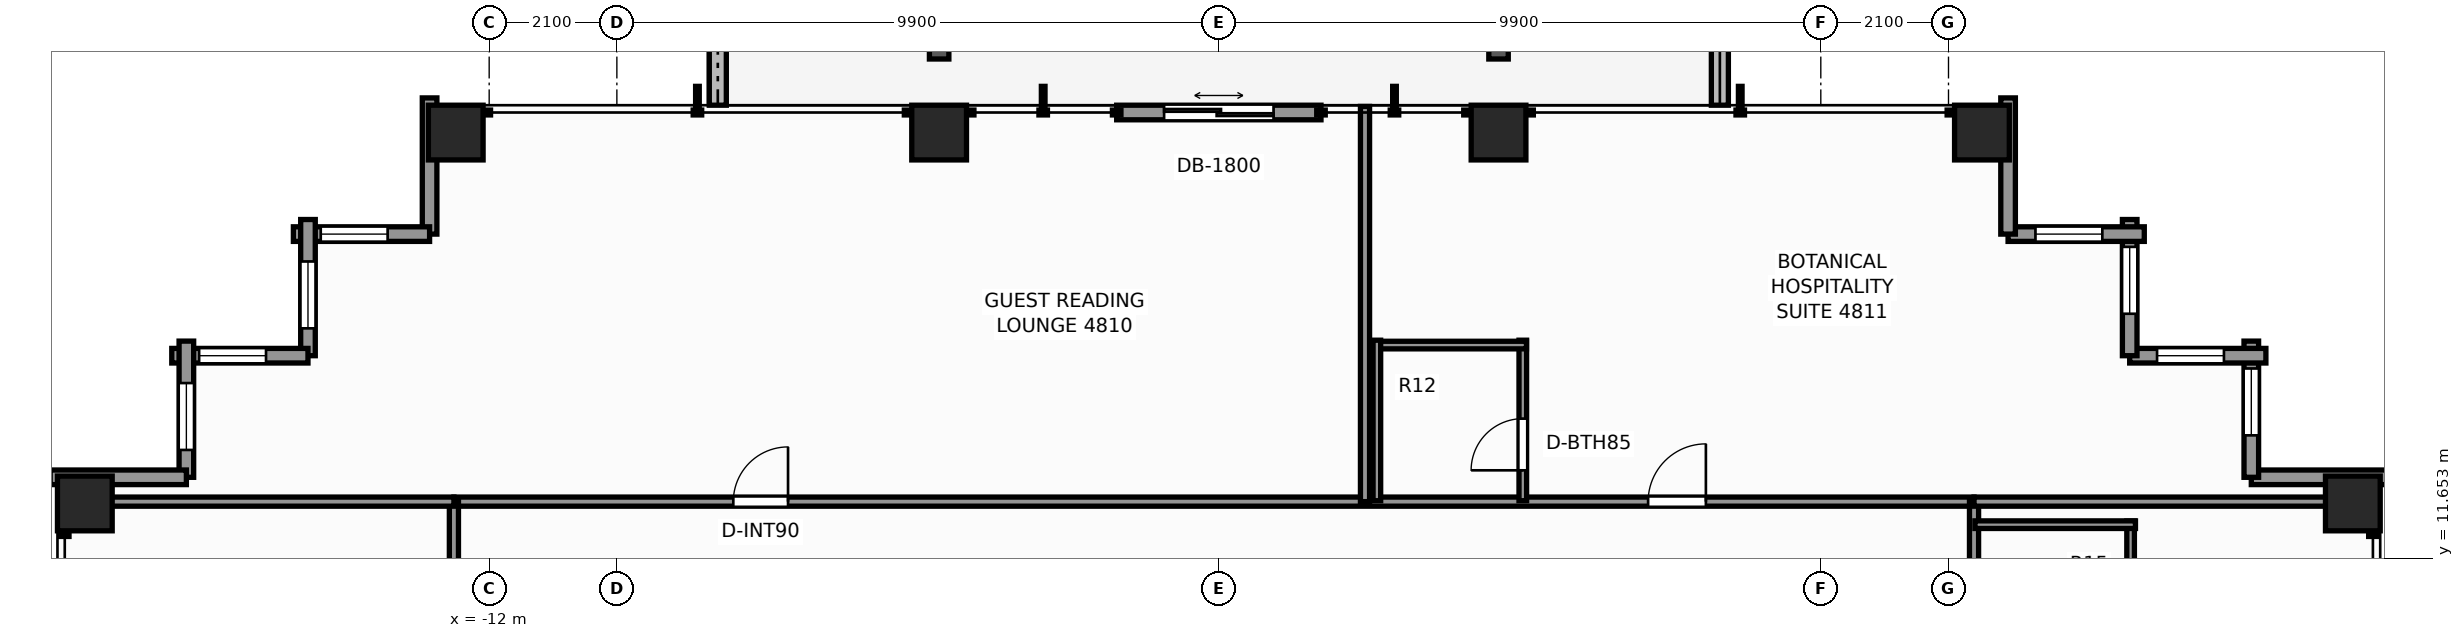
"""IFC4 building model, lengths in metres.
Left out: names, types, materials, properties, quantities, classifications, styles, units other than length and angle.
Written with IfcOpenShell. Run it as: python <this file> out.ifc"""

import sys

from ifc_helpers import new_model, si_unit, direction, frame, frame_2d, origin, origin_2d, place, context, subcontext, project, spatial, rectangle, extrude, element, fill, save


model = new_model("IFC4")
c1 = context("Model", 3, precision=1e-05, world=origin(), true_north=direction((0.0, 1.0)))
c2 = subcontext(c1, "Body", "Model", "MODEL_VIEW")
j1 = project(units=[si_unit("LENGTHUNIT", "METRE"), si_unit("PLANEANGLEUNIT", "RADIAN")], contexts=[c1])
p1 = place(None, origin())
s1 = spatial("IfcSite", under=j1, at=p1, CompositionType="ELEMENT")
p2 = place(p1, origin())
s2 = spatial("IfcBuilding", under=s1, at=p2, CompositionType="ELEMENT")
p3 = place(p2, frame((0.0, 0.0, 166.8)))
s3 = spatial("IfcBuildingStorey", under=s2, at=p3, CompositionType="ELEMENT", Elevation=166.8)
for number, where, z_axis, x_axis in (
    (1, (-12.55, 18.65, 0.0), (0.0, 0.0, 1.0), (1.0, 0.0, 0.0)),
    (2, (-4.6, 18.65, 0.0), (0.0, 0.0, 1.0), (1.0, 0.0, 0.0)),
    (3, (4.6, 18.65, 0.0), (0.0, 0.0, 1.0), (1.0, 0.0, 0.0)),
    (4, (12.55, 18.65, 0.0), (0.0, 0.0, 1.0), (1.0, 0.0, 0.0)),
    (5, (-18.65, 12.55, 0.0), (0.0, 0.0, 1.0), (1.0, 0.0, 0.0)),
    (6, (18.65, 12.55, 0.0), (0.0, 0.0, 1.0), (1.0, 0.0, 0.0)),
):
    element("IfcColumn", number, at=place(p3, frame(where, z_axis=z_axis, x_axis=x_axis)), inside=s3, PredefinedType="COLUMN", context=c2, shape_type="SweptSolid", body=[
        extrude(rectangle(XDim=0.9, YDim=0.9, at=origin_2d()), origin(), (0.0, 0.0, 1.0), 3.3),
    ])
p4 = place(p3, frame((8.24, 19.1, -0.02), z_axis=(0.0, 0.0, 1.0), x_axis=(0.0, 1.0, 0.0)))
e7 = element("IfcWall", 7, at=p4, inside=s3, PredefinedType="PARAPET", context=c2, shape_type="SweptSolid", body=[
    extrude(rectangle(XDim=2.975, YDim=0.28, at=frame_2d((1.487, 0.0))), origin(), (0.0, 0.0, 1.0), 0.42),
])
p5 = place(p3, frame((-8.24, 20.805, -0.02), z_axis=(0.0, 0.0, 1.0), x_axis=(0.0, -1.0, 0.0)))
e8 = element("IfcWall", 8, at=p5, inside=s3, PredefinedType="PARAPET", context=c2, shape_type="SweptSolid", body=[
    extrude(rectangle(XDim=1.705, YDim=0.28, at=frame_2d((0.853, 0.0))), origin(), (0.0, 0.0, 1.0), 0.42),
])
p6 = place(p3, frame((16.98, 12.98, 0.0), z_axis=(0.0, 0.0, 1.0), x_axis=(1.0, 0.0, 0.0)))
e9 = element("IfcWall", 9, at=p6, inside=s3, PredefinedType="STANDARD", context=c2, shape_type="SweptSolid", body=[
    extrude(rectangle(XDim=2.24, YDim=0.24, at=frame_2d((1.12, 0.0))), origin(), (0.0, 0.0, 1.0), 2.483),
])
p7 = place(p3, frame((16.98, 15.22, 0.0), z_axis=(0.0, 0.0, 1.0), x_axis=(0.0, -1.0, 0.0)))
e10 = element("IfcWall", 10, at=p7, inside=s3, PredefinedType="STANDARD", context=c2, shape_type="SweptSolid", body=[
    extrude(rectangle(XDim=2.24, YDim=0.24, at=frame_2d((1.12, 0.0))), origin(), (0.0, 0.0, 1.0), 2.483),
])
p8 = place(p7, frame((0.45, 0.0, 0.65)))
e11 = element("IfcOpeningElement", 11, at=p8, cuts=e10, PredefinedType="OPENING", context=c2, shape_type="SweptSolid", body=[
    extrude(rectangle(XDim=1.1, YDim=1.45, at=frame_2d((0.55, 0.725))), frame((0.0, 0.13, 0.0), z_axis=(0.0, -1.0, 0.0), x_axis=(1.0, 0.0, 0.0)), (0.0, 0.0, 1.0), 0.26),
])
p9 = place(p3, frame((14.98, 14.98, 0.0), z_axis=(0.0, 0.0, 1.0), x_axis=(1.0, 0.0, 0.0)))
e12 = element("IfcWall", 12, at=p9, inside=s3, PredefinedType="STANDARD", context=c2, shape_type="SweptSolid", body=[
    extrude(rectangle(XDim=2.24, YDim=0.24, at=frame_2d((1.12, 0.0))), origin(), (0.0, 0.0, 1.0), 2.483),
])
p10 = place(p9, frame((0.45, 0.0, 0.65)))
e13 = element("IfcOpeningElement", 13, at=p10, cuts=e12, PredefinedType="OPENING", context=c2, shape_type="SweptSolid", body=[
    extrude(rectangle(XDim=1.1, YDim=1.45, at=frame_2d((0.55, 0.725))), frame((0.0, 0.13, 0.0), z_axis=(0.0, -1.0, 0.0), x_axis=(1.0, 0.0, 0.0)), (0.0, 0.0, 1.0), 0.26),
])
p11 = place(p3, frame((14.98, 17.22, 0.0), z_axis=(0.0, 0.0, 1.0), x_axis=(0.0, -1.0, 0.0)))
e14 = element("IfcWall", 14, at=p11, inside=s3, PredefinedType="STANDARD", context=c2, shape_type="SweptSolid", body=[
    extrude(rectangle(XDim=2.24, YDim=0.24, at=frame_2d((1.12, 0.0))), origin(), (0.0, 0.0, 1.0), 2.483),
])
p12 = place(p11, frame((0.45, 0.0, 0.65)))
e15 = element("IfcOpeningElement", 15, at=p12, cuts=e14, PredefinedType="OPENING", context=c2, shape_type="SweptSolid", body=[
    extrude(rectangle(XDim=1.1, YDim=1.45, at=frame_2d((0.55, 0.725))), frame((0.0, 0.13, 0.0), z_axis=(0.0, -1.0, 0.0), x_axis=(1.0, 0.0, 0.0)), (0.0, 0.0, 1.0), 0.26),
])
p13 = place(p3, frame((12.98, 16.98, 0.0), z_axis=(0.0, 0.0, 1.0), x_axis=(1.0, 0.0, 0.0)))
e16 = element("IfcWall", 16, at=p13, inside=s3, PredefinedType="STANDARD", context=c2, shape_type="SweptSolid", body=[
    extrude(rectangle(XDim=2.24, YDim=0.24, at=frame_2d((1.12, 0.0))), origin(), (0.0, 0.0, 1.0), 2.483),
])
p14 = place(p13, frame((0.45, 0.0, 0.65)))
e17 = element("IfcOpeningElement", 17, at=p14, cuts=e16, PredefinedType="OPENING", context=c2, shape_type="SweptSolid", body=[
    extrude(rectangle(XDim=1.1, YDim=1.45, at=frame_2d((0.55, 0.725))), frame((0.0, 0.13, 0.0), z_axis=(0.0, -1.0, 0.0), x_axis=(1.0, 0.0, 0.0)), (0.0, 0.0, 1.0), 0.26),
])
p15 = place(p3, frame((12.98, 19.22, 0.0), z_axis=(0.0, 0.0, 1.0), x_axis=(0.0, -1.0, 0.0)))
e18 = element("IfcWall", 18, at=p15, inside=s3, PredefinedType="STANDARD", context=c2, shape_type="SweptSolid", body=[
    extrude(rectangle(XDim=2.24, YDim=0.24, at=frame_2d((1.12, 0.0))), origin(), (0.0, 0.0, 1.0), 2.483),
])
p16 = place(p3, frame((-1.68, 18.98, 0.0), z_axis=(0.0, 0.0, 1.0), x_axis=(1.0, 0.0, 0.0)))
e19 = element("IfcWall", 19, at=p16, inside=s3, PredefinedType="STANDARD", context=c2, shape_type="SweptSolid", body=[
    extrude(rectangle(XDim=3.36, YDim=0.24, at=frame_2d((1.68, 0.0))), origin(), (0.0, 0.0, 1.0), 3.1),
])
p17 = place(p16, frame((0.78, 0.0, 0.0)))
e20 = element("IfcOpeningElement", 20, at=p17, cuts=e19, PredefinedType="OPENING", context=c2, shape_type="SweptSolid", body=[
    extrude(rectangle(XDim=1.8, YDim=2.2, at=frame_2d((0.9, 1.1))), frame((0.0, 0.13, 0.0), z_axis=(0.0, -1.0, 0.0), x_axis=(1.0, 0.0, 0.0)), (0.0, 0.0, 1.0), 0.26),
])
p18 = place(p3, frame((-12.98, 16.98, 0.0), z_axis=(0.0, 0.0, 1.0), x_axis=(0.0, 1.0, 0.0)))
e21 = element("IfcWall", 21, at=p18, inside=s3, PredefinedType="STANDARD", context=c2, shape_type="SweptSolid", body=[
    extrude(rectangle(XDim=2.24, YDim=0.24, at=frame_2d((1.12, 0.0))), origin(), (0.0, 0.0, 1.0), 2.483),
])
p19 = place(p3, frame((-15.22, 16.98, 0.0), z_axis=(0.0, 0.0, 1.0), x_axis=(1.0, 0.0, 0.0)))
e22 = element("IfcWall", 22, at=p19, inside=s3, PredefinedType="STANDARD", context=c2, shape_type="SweptSolid", body=[
    extrude(rectangle(XDim=2.24, YDim=0.24, at=frame_2d((1.12, 0.0))), origin(), (0.0, 0.0, 1.0), 2.483),
])
p20 = place(p19, frame((0.45, 0.0, 0.65)))
e23 = element("IfcOpeningElement", 23, at=p20, cuts=e22, PredefinedType="OPENING", context=c2, shape_type="SweptSolid", body=[
    extrude(rectangle(XDim=1.1, YDim=1.45, at=frame_2d((0.55, 0.725))), frame((0.0, 0.13, 0.0), z_axis=(0.0, -1.0, 0.0), x_axis=(1.0, 0.0, 0.0)), (0.0, 0.0, 1.0), 0.26),
])
p21 = place(p3, frame((-14.98, 14.98, 0.0), z_axis=(0.0, 0.0, 1.0), x_axis=(0.0, 1.0, 0.0)))
e24 = element("IfcWall", 24, at=p21, inside=s3, PredefinedType="STANDARD", context=c2, shape_type="SweptSolid", body=[
    extrude(rectangle(XDim=2.24, YDim=0.24, at=frame_2d((1.12, 0.0))), origin(), (0.0, 0.0, 1.0), 2.483),
])
p22 = place(p21, frame((0.45, 0.0, 0.65)))
e25 = element("IfcOpeningElement", 25, at=p22, cuts=e24, PredefinedType="OPENING", context=c2, shape_type="SweptSolid", body=[
    extrude(rectangle(XDim=1.1, YDim=1.45, at=frame_2d((0.55, 0.725))), frame((0.0, 0.13, 0.0), z_axis=(0.0, -1.0, 0.0), x_axis=(1.0, 0.0, 0.0)), (0.0, 0.0, 1.0), 0.26),
])
p23 = place(p3, frame((-17.22, 14.98, 0.0), z_axis=(0.0, 0.0, 1.0), x_axis=(1.0, 0.0, 0.0)))
e26 = element("IfcWall", 26, at=p23, inside=s3, PredefinedType="STANDARD", context=c2, shape_type="SweptSolid", body=[
    extrude(rectangle(XDim=2.24, YDim=0.24, at=frame_2d((1.12, 0.0))), origin(), (0.0, 0.0, 1.0), 2.483),
])
p24 = place(p23, frame((0.45, 0.0, 0.65)))
e27 = element("IfcOpeningElement", 27, at=p24, cuts=e26, PredefinedType="OPENING", context=c2, shape_type="SweptSolid", body=[
    extrude(rectangle(XDim=1.1, YDim=1.45, at=frame_2d((0.55, 0.725))), frame((0.0, 0.13, 0.0), z_axis=(0.0, -1.0, 0.0), x_axis=(1.0, 0.0, 0.0)), (0.0, 0.0, 1.0), 0.26),
])
p25 = place(p3, frame((-16.98, 12.98, 0.0), z_axis=(0.0, 0.0, 1.0), x_axis=(0.0, 1.0, 0.0)))
e28 = element("IfcWall", 28, at=p25, inside=s3, PredefinedType="STANDARD", context=c2, shape_type="SweptSolid", body=[
    extrude(rectangle(XDim=2.24, YDim=0.24, at=frame_2d((1.12, 0.0))), origin(), (0.0, 0.0, 1.0), 2.483),
])
p26 = place(p25, frame((0.45, 0.0, 0.65)))
e29 = element("IfcOpeningElement", 29, at=p26, cuts=e28, PredefinedType="OPENING", context=c2, shape_type="SweptSolid", body=[
    extrude(rectangle(XDim=1.1, YDim=1.45, at=frame_2d((0.55, 0.725))), frame((0.0, 0.13, 0.0), z_axis=(0.0, -1.0, 0.0), x_axis=(1.0, 0.0, 0.0)), (0.0, 0.0, 1.0), 0.26),
])
p27 = place(p3, frame((-19.22, 12.98, 0.0), z_axis=(0.0, 0.0, 1.0), x_axis=(1.0, 0.0, 0.0)))
e30 = element("IfcWall", 30, at=p27, inside=s3, PredefinedType="STANDARD", context=c2, shape_type="SweptSolid", body=[
    extrude(rectangle(XDim=2.24, YDim=0.24, at=frame_2d((1.12, 0.0))), origin(), (0.0, 0.0, 1.0), 2.483),
])
p28 = place(p3, frame((-12.58, 12.58, 0.0), z_axis=(0.0, 0.0, 1.0), x_axis=(1.0, 0.0, 0.0)))
e31 = element("IfcWall", 31, at=p28, inside=s3, PredefinedType="PARTITIONING", context=c2, shape_type="SweptSolid", body=[
    extrude(rectangle(XDim=25.0, YDim=0.15, at=frame_2d((12.5, 0.0))), origin(), (0.0, 0.0, 1.0), 2.389),
])
p29 = place(p28, frame((4.595, 0.0, 0.0)))
e32 = element("IfcOpeningElement", 32, at=p29, cuts=e31, PredefinedType="OPENING", context=c2, shape_type="SweptSolid", body=[
    extrude(rectangle(XDim=0.9, YDim=2.06, at=frame_2d((0.45, 1.03))), frame((0.0, 0.085, 0.0), z_axis=(0.0, -1.0, 0.0), x_axis=(1.0, 0.0, 0.0)), (0.0, 0.0, 1.0), 0.17),
])
p30 = place(p28, frame((19.64, 0.0, 0.0)))
e33 = element("IfcOpeningElement", 33, at=p30, cuts=e31, PredefinedType="OPENING", context=c2, shape_type="SweptSolid", body=[
    extrude(rectangle(XDim=0.95, YDim=2.06, at=frame_2d((0.475, 1.03))), frame((0.0, 0.085, 0.0), z_axis=(0.0, -1.0, 0.0), x_axis=(1.0, 0.0, 0.0)), (0.0, 0.0, 1.0), 0.17),
])
p31 = place(p3, frame((-12.58, -12.26, 0.0), z_axis=(0.0, 0.0, 1.0), x_axis=(0.0, 1.0, 0.0)))
e34 = element("IfcWall", 34, at=p31, inside=s3, PredefinedType="PARTITIONING", context=c2, shape_type="SweptSolid", body=[
    extrude(rectangle(XDim=24.84, YDim=0.15, at=frame_2d((12.42, 0.0))), origin(), (0.0, 0.0, 1.0), 2.389),
])
p32 = place(p31, frame((3.913, 0.0, 0.0)))
e35 = element("IfcOpeningElement", 35, at=p32, cuts=e34, PredefinedType="OPENING", context=c2, shape_type="SweptSolid", body=[
    extrude(rectangle(XDim=0.95, YDim=2.06, at=frame_2d((0.475, 1.03))), frame((0.0, 0.085, 0.0), z_axis=(0.0, -1.0, 0.0), x_axis=(1.0, 0.0, 0.0)), (0.0, 0.0, 1.0), 0.17),
])
p33 = place(p31, frame((19.345, 0.0, 0.0)))
e36 = element("IfcOpeningElement", 36, at=p33, cuts=e34, PredefinedType="OPENING", context=c2, shape_type="SweptSolid", body=[
    extrude(rectangle(XDim=0.9, YDim=2.06, at=frame_2d((0.45, 1.03))), frame((0.0, 0.085, 0.0), z_axis=(0.0, -1.0, 0.0), x_axis=(1.0, 0.0, 0.0)), (0.0, 0.0, 1.0), 0.17),
])
p34 = place(p3, frame((12.42, -12.26, 0.0), z_axis=(0.0, 0.0, 1.0), x_axis=(0.0, 1.0, 0.0)))
e37 = element("IfcWall", 37, at=p34, inside=s3, PredefinedType="PARTITIONING", context=c2, shape_type="SweptSolid", body=[
    extrude(rectangle(XDim=24.84, YDim=0.15, at=frame_2d((12.42, 0.0))), origin(), (0.0, 0.0, 1.0), 2.389),
])
p35 = place(p34, frame((2.798, 0.0, 0.0)))
e38 = element("IfcOpeningElement", 38, at=p35, cuts=e37, PredefinedType="OPENING", context=c2, shape_type="SweptSolid", body=[
    extrude(rectangle(XDim=0.95, YDim=2.06, at=frame_2d((0.475, 1.03))), frame((0.0, 0.085, 0.0), z_axis=(0.0, -1.0, 0.0), x_axis=(1.0, 0.0, 0.0)), (0.0, 0.0, 1.0), 0.17),
])
p36 = place(p34, frame((9.633, 0.0, 0.0)))
e39 = element("IfcOpeningElement", 39, at=p36, cuts=e37, PredefinedType="OPENING", context=c2, shape_type="SweptSolid", body=[
    extrude(rectangle(XDim=0.95, YDim=2.06, at=frame_2d((0.475, 1.03))), frame((0.0, 0.085, 0.0), z_axis=(0.0, -1.0, 0.0), x_axis=(1.0, 0.0, 0.0)), (0.0, 0.0, 1.0), 0.17),
])
p37 = place(p34, frame((17.958, 0.0, 0.0)))
e40 = element("IfcOpeningElement", 40, at=p37, cuts=e37, PredefinedType="OPENING", context=c2, shape_type="SweptSolid", body=[
    extrude(rectangle(XDim=0.95, YDim=2.06, at=frame_2d((0.475, 1.03))), frame((0.0, 0.085, 0.0), z_axis=(0.0, -1.0, 0.0), x_axis=(1.0, 0.0, 0.0)), (0.0, 0.0, 1.0), 0.17),
])
p38 = place(p34, frame((20.184, 0.0, 0.0)))
e41 = element("IfcOpeningElement", 41, at=p38, cuts=e37, PredefinedType="OPENING", context=c2, shape_type="SweptSolid", body=[
    extrude(rectangle(XDim=0.95, YDim=2.06, at=frame_2d((0.475, 1.03))), frame((0.0, 0.085, 0.0), z_axis=(0.0, -1.0, 0.0), x_axis=(1.0, 0.0, 0.0)), (0.0, 0.0, 1.0), 0.17),
])
p39 = place(p3, frame((-19.08, 12.58, 0.0), z_axis=(0.0, 0.0, 1.0), x_axis=(1.0, 0.0, 0.0)))
e42 = element("IfcWall", 42, at=p39, inside=s3, PredefinedType="PARTITIONING", context=c2, shape_type="SweptSolid", body=[
    extrude(rectangle(XDim=6.5, YDim=0.15, at=frame_2d((3.25, 0.0))), origin(), (0.0, 0.0, 1.0), 2.389),
])
p40 = place(p3, frame((12.42, 12.58, 0.0), z_axis=(0.0, 0.0, 1.0), x_axis=(1.0, 0.0, 0.0)))
e43 = element("IfcWall", 43, at=p40, inside=s3, PredefinedType="PARTITIONING", context=c2, shape_type="SweptSolid", body=[
    extrude(rectangle(XDim=6.66, YDim=0.15, at=frame_2d((3.33, 0.0))), origin(), (0.0, 0.0, 1.0), 2.389),
])
p41 = place(p3, frame((14.995, 9.741, 0.0), z_axis=(0.0, 0.0, 1.0), x_axis=(0.0, 1.0, 0.0)))
e44 = element("IfcWall", 44, at=p41, inside=s3, PredefinedType="PARTITIONING", context=c2, shape_type="SweptSolid", body=[
    extrude(rectangle(XDim=2.52, YDim=0.125, at=frame_2d((1.26, 0.0))), origin(), (0.0, 0.0, 1.0), 2.389),
])
p42 = place(p3, frame((12.435, 12.201, 0.0), z_axis=(0.0, 0.0, 1.0), x_axis=(1.0, 0.0, 0.0)))
e45 = element("IfcWall", 45, at=p42, inside=s3, PredefinedType="PARTITIONING", context=c2, shape_type="SweptSolid", body=[
    extrude(rectangle(XDim=2.64, YDim=0.125, at=frame_2d((1.32, 0.0))), origin(), (0.0, 0.0, 1.0), 3.1),
])
p43 = place(p3, frame((2.404, 12.58, 0.0), z_axis=(0.0, 0.0, 1.0), x_axis=(0.0, 1.0, 0.0)))
e46 = element("IfcWall", 46, at=p43, inside=s3, PredefinedType="PARTITIONING", context=c2, shape_type="SweptSolid", body=[
    extrude(rectangle(XDim=6.5, YDim=0.15, at=frame_2d((3.25, 0.0))), origin(), (0.0, 0.0, 1.0), 2.473),
])
p44 = place(p3, frame((4.999, 12.595, 0.0), z_axis=(0.0, 0.0, 1.0), x_axis=(0.0, 1.0, 0.0)))
e47 = element("IfcWall", 47, at=p44, inside=s3, PredefinedType="PARTITIONING", context=c2, shape_type="SweptSolid", body=[
    extrude(rectangle(XDim=2.64, YDim=0.125, at=frame_2d((1.32, 0.0))), origin(), (0.0, 0.0, 1.0), 3.1),
])
p45 = place(p44, frame((0.5, 0.0, 0.0)))
e48 = element("IfcOpeningElement", 48, at=p45, cuts=e47, PredefinedType="OPENING", context=c2, shape_type="SweptSolid", body=[
    extrude(rectangle(XDim=0.85, YDim=2.03, at=frame_2d((0.425, 1.015))), frame((0.0, 0.073, 0.0), z_axis=(0.0, -1.0, 0.0), x_axis=(1.0, 0.0, 0.0)), (0.0, 0.0, 1.0), 0.145),
])
p46 = place(p3, frame((2.539, 15.155, 0.0), z_axis=(0.0, 0.0, 1.0), x_axis=(1.0, 0.0, 0.0)))
e49 = element("IfcWall", 49, at=p46, inside=s3, PredefinedType="PARTITIONING", context=c2, shape_type="SweptSolid", body=[
    extrude(rectangle(XDim=2.52, YDim=0.125, at=frame_2d((1.26, 0.0))), origin(), (0.0, 0.0, 1.0), 2.389),
])
p47 = place(p3, frame((2.599, 12.595, 0.0), z_axis=(0.0, 0.0, 1.0), x_axis=(0.0, 1.0, 0.0)))
e50 = element("IfcWall", 50, at=p47, inside=s3, PredefinedType="PARTITIONING", context=c2, shape_type="SweptSolid", body=[
    extrude(rectangle(XDim=2.64, YDim=0.125, at=frame_2d((1.32, 0.0))), origin(), (0.0, 0.0, 1.0), 3.1),
])
p48 = place(p8, origin())
e51 = element("IfcWindow", 51, at=p48, inside=s3, PartitioningType="SINGLE_PANEL", PredefinedType="WINDOW", context=c2, shape_type="SweptSolid", body=[
    extrude(rectangle(XDim=1.1, YDim=1.45, at=frame_2d((0.55, 0.725))), frame((0.0, 0.03, 0.0), z_axis=(0.0, -1.0, 0.0), x_axis=(1.0, 0.0, 0.0)), (0.0, 0.0, 1.0), 0.06),
])
fill(e11, e51)
p49 = place(p10, origin())
e52 = element("IfcWindow", 52, at=p49, inside=s3, PartitioningType="SINGLE_PANEL", PredefinedType="WINDOW", context=c2, shape_type="SweptSolid", body=[
    extrude(rectangle(XDim=1.1, YDim=1.45, at=frame_2d((0.55, 0.725))), frame((0.0, 0.03, 0.0), z_axis=(0.0, -1.0, 0.0), x_axis=(1.0, 0.0, 0.0)), (0.0, 0.0, 1.0), 0.06),
])
fill(e13, e52)
p50 = place(p12, origin())
e53 = element("IfcWindow", 53, at=p50, inside=s3, PartitioningType="SINGLE_PANEL", PredefinedType="WINDOW", context=c2, shape_type="SweptSolid", body=[
    extrude(rectangle(XDim=1.1, YDim=1.45, at=frame_2d((0.55, 0.725))), frame((0.0, 0.03, 0.0), z_axis=(0.0, -1.0, 0.0), x_axis=(1.0, 0.0, 0.0)), (0.0, 0.0, 1.0), 0.06),
])
fill(e15, e53)
p51 = place(p14, origin())
e54 = element("IfcWindow", 54, at=p51, inside=s3, PartitioningType="SINGLE_PANEL", PredefinedType="WINDOW", context=c2, shape_type="SweptSolid", body=[
    extrude(rectangle(XDim=1.1, YDim=1.45, at=frame_2d((0.55, 0.725))), frame((0.0, 0.03, 0.0), z_axis=(0.0, -1.0, 0.0), x_axis=(1.0, 0.0, 0.0)), (0.0, 0.0, 1.0), 0.06),
])
fill(e17, e54)
p52 = place(p17, origin())
e55 = element("IfcDoor", 55, at=p52, inside=s3, OperationType="DOUBLE_DOOR_SLIDING", PredefinedType="DOOR", context=c2, shape_type="SweptSolid", body=[
    extrude(rectangle(XDim=1.8, YDim=2.2, at=frame_2d((0.9, 1.1))), frame((0.0, 0.025, 0.0), z_axis=(0.0, -1.0, 0.0), x_axis=(1.0, 0.0, 0.0)), (0.0, 0.0, 1.0), 0.05),
])
fill(e20, e55)
p53 = place(p20, origin())
e56 = element("IfcWindow", 56, at=p53, inside=s3, PartitioningType="SINGLE_PANEL", PredefinedType="WINDOW", context=c2, shape_type="SweptSolid", body=[
    extrude(rectangle(XDim=1.1, YDim=1.45, at=frame_2d((0.55, 0.725))), frame((0.0, 0.03, 0.0), z_axis=(0.0, -1.0, 0.0), x_axis=(1.0, 0.0, 0.0)), (0.0, 0.0, 1.0), 0.06),
])
fill(e23, e56)
p54 = place(p22, origin())
e57 = element("IfcWindow", 57, at=p54, inside=s3, PartitioningType="SINGLE_PANEL", PredefinedType="WINDOW", context=c2, shape_type="SweptSolid", body=[
    extrude(rectangle(XDim=1.1, YDim=1.45, at=frame_2d((0.55, 0.725))), frame((0.0, 0.03, 0.0), z_axis=(0.0, -1.0, 0.0), x_axis=(1.0, 0.0, 0.0)), (0.0, 0.0, 1.0), 0.06),
])
fill(e25, e57)
p55 = place(p24, origin())
e58 = element("IfcWindow", 58, at=p55, inside=s3, PartitioningType="SINGLE_PANEL", PredefinedType="WINDOW", context=c2, shape_type="SweptSolid", body=[
    extrude(rectangle(XDim=1.1, YDim=1.45, at=frame_2d((0.55, 0.725))), frame((0.0, 0.03, 0.0), z_axis=(0.0, -1.0, 0.0), x_axis=(1.0, 0.0, 0.0)), (0.0, 0.0, 1.0), 0.06),
])
fill(e27, e58)
p56 = place(p26, origin())
e59 = element("IfcWindow", 59, at=p56, inside=s3, PartitioningType="SINGLE_PANEL", PredefinedType="WINDOW", context=c2, shape_type="SweptSolid", body=[
    extrude(rectangle(XDim=1.1, YDim=1.45, at=frame_2d((0.55, 0.725))), frame((0.0, 0.03, 0.0), z_axis=(0.0, -1.0, 0.0), x_axis=(1.0, 0.0, 0.0)), (0.0, 0.0, 1.0), 0.06),
])
fill(e29, e59)
p57 = place(p29, origin())
e60 = element("IfcDoor", 60, at=p57, inside=s3, OperationType="SINGLE_SWING_RIGHT", PredefinedType="DOOR", context=c2, shape_type="SweptSolid", body=[
    extrude(rectangle(XDim=0.9, YDim=2.06, at=frame_2d((0.45, 1.03))), frame((0.0, 0.025, 0.0), z_axis=(0.0, -1.0, 0.0), x_axis=(1.0, 0.0, 0.0)), (0.0, 0.0, 1.0), 0.05),
])
fill(e32, e60)
p58 = place(p45, origin())
e61 = element("IfcDoor", 61, at=p58, inside=s3, OperationType="SINGLE_SWING_LEFT", PredefinedType="DOOR", context=c2, shape_type="SweptSolid", body=[
    extrude(rectangle(XDim=0.85, YDim=2.03, at=frame_2d((0.425, 1.015))), frame((0.0, 0.025, 0.0), z_axis=(0.0, -1.0, 0.0), x_axis=(1.0, 0.0, 0.0)), (0.0, 0.0, 1.0), 0.05),
])
fill(e48, e61)
p59 = place(p30, origin())
e62 = element("IfcDoor", 62, at=p59, inside=s3, OperationType="SINGLE_SWING_RIGHT", PredefinedType="DOOR", context=c2, shape_type="SweptSolid", body=[
    extrude(rectangle(XDim=0.95, YDim=2.06, at=frame_2d((0.475, 1.03))), frame((0.0, 0.025, 0.0), z_axis=(0.0, -1.0, 0.0), x_axis=(1.0, 0.0, 0.0)), (0.0, 0.0, 1.0), 0.05),
])
fill(e33, e62)
save(model, sys.argv[1])
